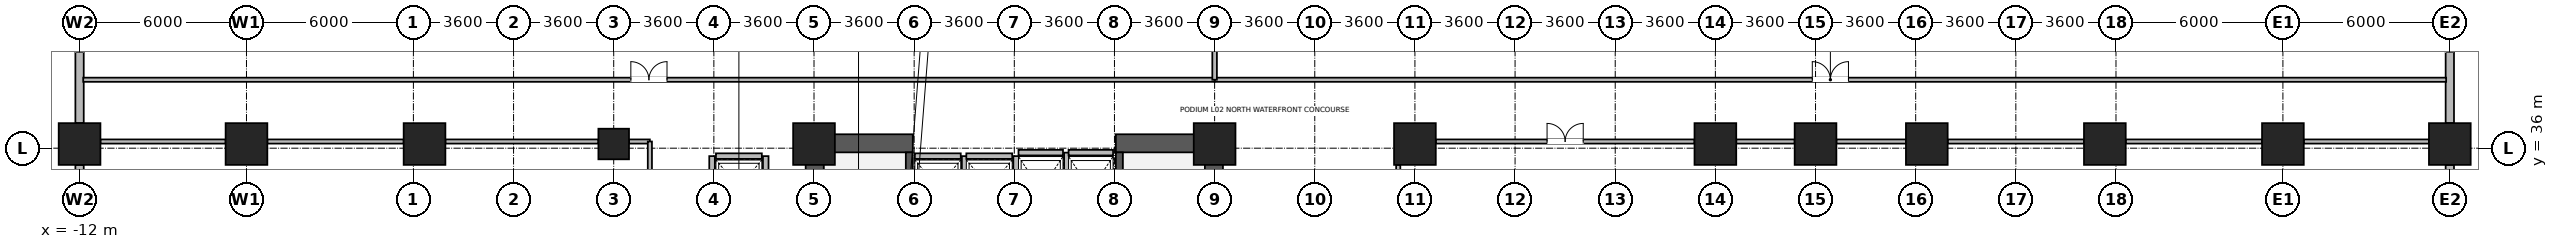
"""IFC4 building model, lengths in metres.
Left out: names, types, materials, properties, quantities, classifications, styles, units other than length and angle.
Written with IfcOpenShell. Run it as: python <this file> out.ifc"""

import sys

from ifc_helpers import new_model, si_unit, direction, frame, frame_2d, origin, origin_2d, place, context, subcontext, project, spatial, rectangle, circle, extrude, source, transform, mapped, element, fill, save


model = new_model("IFC4")
c1 = context("Model", 3, precision=1e-05, world=origin(), true_north=direction((0.0, 1.0)))
c2 = subcontext(c1, "Body", "Model", "MODEL_VIEW")
j1 = project(units=[si_unit("LENGTHUNIT", "METRE"), si_unit("PLANEANGLEUNIT", "RADIAN")], contexts=[c1])
p1 = place(None, origin())
s1 = spatial("IfcSite", under=j1, at=p1, CompositionType="ELEMENT")
p2 = place(p1, origin())
s2 = spatial("IfcBuilding", under=s1, at=p2, CompositionType="ELEMENT")
p3 = place(p2, frame((0.0, 0.0, 10.2)))
s3 = spatial("IfcBuildingStorey", under=s2, at=p3, CompositionType="ELEMENT", Elevation=10.2)
for number, where, z_axis, x_axis in (
    (1, (14.425, 28.2, 0.0), (0.0, 0.0, 1.0), (0.0, 1.0, 0.0)),
    (2, (28.775, 28.2, 0.0), (0.0, 0.0, 1.0), (0.0, 1.0, 0.0)),
):
    element("IfcWall", number, at=place(p3, frame(where, z_axis=z_axis, x_axis=x_axis)), inside=s3, PredefinedType="SHEAR", context=c2, shape_type="SweptSolid", body=[
        extrude(rectangle(XDim=8.3, YDim=0.65, at=frame_2d((4.15, 0.0))), origin(), (0.0, 0.0, 1.0), 4.52),
    ])
for number, where, z_axis, x_axis in (
    (3, (14.75, 36.175, 0.0), (0.0, 0.0, 1.0), (1.0, 0.0, 0.0)),
    (4, (25.25, 36.175, 0.0), (0.0, 0.0, 1.0), (1.0, 0.0, 0.0)),
):
    element("IfcWall", number, at=place(p3, frame(where, z_axis=z_axis, x_axis=x_axis)), inside=s3, PredefinedType="SHEAR", context=c2, shape_type="SweptSolid", body=[
        extrude(rectangle(XDim=3.2, YDim=0.65, at=frame_2d((1.6, 0.0))), origin(), (0.0, 0.0, 1.0), 4.52),
    ])
p4 = place(p3, frame((17.825, 28.85, 0.0), z_axis=(0.0, 0.0, 1.0), x_axis=(0.0, 1.0, 0.0)))
e5 = element("IfcWall", 5, at=p4, inside=s3, PredefinedType="SHEAR", context=c2, shape_type="SweptSolid", body=[
    extrude(rectangle(XDim=7.0, YDim=0.25, at=frame_2d((3.5, 0.0))), origin(), (0.0, 0.0, 1.0), 4.52),
])
p5 = place(p4, frame((0.15, 0.0, 0.0)))
e6 = element("IfcOpeningElement", 6, at=p5, cuts=e5, PredefinedType="OPENING", context=c2, shape_type="SweptSolid", body=[
    extrude(rectangle(XDim=1.1, YDim=2.08, at=frame_2d((0.55, 1.04))), frame((0.0, 0.135, 0.0), z_axis=(0.0, -1.0, 0.0), x_axis=(1.0, 0.0, 0.0)), (0.0, 0.0, 1.0), 0.27),
])
p6 = place(p3, frame((25.375, 28.85, 0.0), z_axis=(0.0, 0.0, 1.0), x_axis=(0.0, 1.0, 0.0)))
e7 = element("IfcWall", 7, at=p6, inside=s3, PredefinedType="SHEAR", context=c2, shape_type="SweptSolid", body=[
    extrude(rectangle(XDim=7.0, YDim=0.25, at=frame_2d((3.5, 0.0))), origin(), (0.0, 0.0, 1.0), 4.52),
])
p7 = place(p6, frame((0.15, 0.0, 0.0)))
e8 = element("IfcOpeningElement", 8, at=p7, cuts=e7, PredefinedType="OPENING", context=c2, shape_type="SweptSolid", body=[
    extrude(rectangle(XDim=1.1, YDim=2.08, at=frame_2d((0.55, 1.04))), frame((0.0, 0.135, 0.0), z_axis=(0.0, -1.0, 0.0), x_axis=(1.0, 0.0, 0.0)), (0.0, 0.0, 1.0), 0.27),
])
m1 = source(origin(), c2, "Body", "SweptSolid", [
    extrude(circle(Radius=0.55, at=origin_2d()), origin(), (0.0, 0.0, 1.0), 4.8),
])
p8 = place(p3, frame((7.2, 36.15, 0.0), z_axis=(0.0, 0.0, 1.0), x_axis=(1.0, 0.0, 0.0)))
e9 = element("IfcColumn", 9, at=p8, inside=s3, PredefinedType="COLUMN", context=c2, shape_type="MappedRepresentation", body=[
    mapped(m1, transform((0.0, 0.0, 0.0), x_axis=(1.0, 0.0, 0.0), y_axis=(0.0, 1.0, 0.0), z_axis=(0.0, 0.0, 1.0), scale=1.0)),
])
m2 = source(origin(), c2, "Body", "SweptSolid", [
    extrude(rectangle(XDim=1.5, YDim=1.5, at=origin_2d()), origin(), (0.0, 0.0, 1.0), 4.8),
])
for number, where, z_axis, x_axis in (
    (10, (14.4, 36.15, 0.0), (0.0, 0.0, 1.0), (1.0, 0.0, 0.0)),
    (11, (28.8, 36.15, 0.0), (0.0, 0.0, 1.0), (1.0, 0.0, 0.0)),
    (12, (36.0, 36.15, 0.0), (0.0, 0.0, 1.0), (1.0, 0.0, 0.0)),
    (13, (46.8, 36.15, 0.0), (0.0, 0.0, 1.0), (1.0, 0.0, 0.0)),
    (14, (50.4, 36.15, 0.0), (0.0, 0.0, 1.0), (1.0, 0.0, 0.0)),
    (15, (54.4, 36.15, 0.0), (0.0, 0.0, 1.0), (1.0, 0.0, 0.0)),
    (16, (0.4, 36.15, 0.0), (0.0, 0.0, 1.0), (1.0, 0.0, 0.0)),
    (17, (60.8, 36.15, 0.0), (0.0, 0.0, 1.0), (1.0, 0.0, 0.0)),
    (18, (-12.0, 36.15, 0.0), (0.0, 0.0, 1.0), (1.0, 0.0, 0.0)),
    (19, (-6.0, 36.15, 0.0), (0.0, 0.0, 1.0), (1.0, 0.0, 0.0)),
    (20, (67.2, 36.15, 0.0), (0.0, 0.0, 1.0), (1.0, 0.0, 0.0)),
    (21, (73.2, 36.15, 0.0), (0.0, 0.0, 1.0), (1.0, 0.0, 0.0)),
):
    element("IfcColumn", number, at=place(p3, frame(where, z_axis=z_axis, x_axis=x_axis)), inside=s3, PredefinedType="COLUMN", context=c2, shape_type="MappedRepresentation", body=[
        mapped(m2, transform((0.0, 0.0, 0.0), x_axis=(1.0, 0.0, 0.0), y_axis=(0.0, 1.0, 0.0), z_axis=(0.0, 0.0, 1.0), scale=1.0)),
    ])
p9 = place(p3, frame((73.2, 35.399, 0.0), z_axis=(0.0, 0.0, 1.0), x_axis=(0.0, -1.0, 0.0)))
e22 = element("IfcWall", 22, at=p9, inside=s3, PredefinedType="STANDARD", context=c2, shape_type="SweptSolid", body=[
    extrude(rectangle(XDim=5.998, YDim=0.3, at=frame_2d((2.999, 0.0))), origin(), (0.0, 0.0, 1.0), 3.9),
])
p10 = place(p9, frame((2.524, 0.0, 0.9)))
e23 = element("IfcOpeningElement", 23, at=p10, cuts=e22, PredefinedType="OPENING", context=c2, shape_type="SweptSolid", body=[
    extrude(rectangle(XDim=0.95, YDim=1.75, at=frame_2d((0.475, 0.875))), frame((0.0, 0.16, 0.0), z_axis=(0.0, -1.0, 0.0), x_axis=(1.0, 0.0, 0.0)), (0.0, 0.0, 1.0), 0.32),
])
p11 = place(p9, frame((1.037, 0.0, 0.9)))
e24 = element("IfcOpeningElement", 24, at=p11, cuts=e22, PredefinedType="OPENING", context=c2, shape_type="SweptSolid", body=[
    extrude(rectangle(XDim=0.95, YDim=1.75, at=frame_2d((0.475, 0.875))), frame((0.0, 0.16, 0.0), z_axis=(0.0, -1.0, 0.0), x_axis=(1.0, 0.0, 0.0)), (0.0, 0.0, 1.0), 0.32),
])
p12 = place(p3, frame((73.2, 44.099, 0.0), z_axis=(0.0, 0.0, 1.0), x_axis=(0.0, -1.0, 0.0)))
e25 = element("IfcWall", 25, at=p12, inside=s3, PredefinedType="STANDARD", context=c2, shape_type="SweptSolid", body=[
    extrude(rectangle(XDim=7.198, YDim=0.3, at=frame_2d((3.599, 0.0))), origin(), (0.0, 0.0, 1.0), 3.9),
])
p13 = place(p12, frame((0.6, 0.0, 0.9)))
e26 = element("IfcOpeningElement", 26, at=p13, cuts=e25, PredefinedType="OPENING", context=c2, shape_type="SweptSolid", body=[
    extrude(rectangle(XDim=2.4, YDim=2.5, at=frame_2d((1.2, 1.25))), frame((0.0, 0.16, 0.0), z_axis=(0.0, -1.0, 0.0), x_axis=(1.0, 0.0, 0.0)), (0.0, 0.0, 1.0), 0.32),
])
p14 = place(p12, frame((3.7, 0.0, 0.9)))
e27 = element("IfcOpeningElement", 27, at=p14, cuts=e25, PredefinedType="OPENING", context=c2, shape_type="SweptSolid", body=[
    extrude(rectangle(XDim=0.95, YDim=1.75, at=frame_2d((0.475, 0.875))), frame((0.0, 0.16, 0.0), z_axis=(0.0, -1.0, 0.0), x_axis=(1.0, 0.0, 0.0)), (0.0, 0.0, 1.0), 0.32),
])
p15 = place(p3, frame((-12.0, 36.901, 0.0), z_axis=(0.0, 0.0, 1.0), x_axis=(0.0, 1.0, 0.0)))
e28 = element("IfcWall", 28, at=p15, inside=s3, PredefinedType="STANDARD", context=c2, shape_type="SweptSolid", body=[
    extrude(rectangle(XDim=7.198, YDim=0.3, at=frame_2d((3.599, 0.0))), origin(), (0.0, 0.0, 1.0), 3.9),
])
p16 = place(p15, frame((4.198, 0.0, 0.9)))
e29 = element("IfcOpeningElement", 29, at=p16, cuts=e28, PredefinedType="OPENING", context=c2, shape_type="SweptSolid", body=[
    extrude(rectangle(XDim=2.4, YDim=2.5, at=frame_2d((1.2, 1.25))), frame((0.0, 0.16, 0.0), z_axis=(0.0, -1.0, 0.0), x_axis=(1.0, 0.0, 0.0)), (0.0, 0.0, 1.0), 0.32),
])
p17 = place(p15, frame((2.548, 0.0, 0.9)))
e30 = element("IfcOpeningElement", 30, at=p17, cuts=e28, PredefinedType="OPENING", context=c2, shape_type="SweptSolid", body=[
    extrude(rectangle(XDim=0.95, YDim=1.75, at=frame_2d((0.475, 0.875))), frame((0.0, 0.16, 0.0), z_axis=(0.0, -1.0, 0.0), x_axis=(1.0, 0.0, 0.0)), (0.0, 0.0, 1.0), 0.32),
])
p18 = place(p3, frame((-12.0, 29.401, 0.0), z_axis=(0.0, 0.0, 1.0), x_axis=(0.0, 1.0, 0.0)))
e31 = element("IfcWall", 31, at=p18, inside=s3, PredefinedType="STANDARD", context=c2, shape_type="SweptSolid", body=[
    extrude(rectangle(XDim=5.998, YDim=0.3, at=frame_2d((2.999, 0.0))), origin(), (0.0, 0.0, 1.0), 3.9),
])
p19 = place(p18, frame((2.524, 0.0, 0.9)))
e32 = element("IfcOpeningElement", 32, at=p19, cuts=e31, PredefinedType="OPENING", context=c2, shape_type="SweptSolid", body=[
    extrude(rectangle(XDim=0.95, YDim=1.75, at=frame_2d((0.475, 0.875))), frame((0.0, 0.16, 0.0), z_axis=(0.0, -1.0, 0.0), x_axis=(1.0, 0.0, 0.0)), (0.0, 0.0, 1.0), 0.32),
])
p20 = place(p18, frame((1.037, 0.0, 0.9)))
e33 = element("IfcOpeningElement", 33, at=p20, cuts=e31, PredefinedType="OPENING", context=c2, shape_type="SweptSolid", body=[
    extrude(rectangle(XDim=0.95, YDim=1.75, at=frame_2d((0.475, 0.875))), frame((0.0, 0.16, 0.0), z_axis=(0.0, -1.0, 0.0), x_axis=(1.0, 0.0, 0.0)), (0.0, 0.0, 1.0), 0.32),
])
p21 = place(p3, frame((18.025, 35.715, 0.0), z_axis=(0.0, 0.0, 1.0), x_axis=(1.0, 0.0, 0.0)))
e34 = element("IfcWall", 34, at=p21, inside=s3, PredefinedType="PARTITIONING", context=c2, shape_type="SweptSolid", body=[
    extrude(rectangle(XDim=1.65, YDim=0.2, at=frame_2d((0.825, 0.0))), origin(), (0.0, 0.0, 1.0), 4.5),
])
p22 = place(p3, frame((19.815, 33.485, 0.0), z_axis=(0.0, 0.0, 1.0), x_axis=(0.0, 1.0, 0.0)))
e35 = element("IfcWall", 35, at=p22, inside=s3, PredefinedType="PARTITIONING", context=c2, shape_type="SweptSolid", body=[
    extrude(rectangle(XDim=2.23, YDim=0.2, at=frame_2d((1.115, 0.0))), origin(), (0.0, 0.0, 1.0), 4.5),
])
p23 = place(p3, frame((19.875, 35.715, 0.0), z_axis=(0.0, 0.0, 1.0), x_axis=(1.0, 0.0, 0.0)))
e36 = element("IfcWall", 36, at=p23, inside=s3, PredefinedType="PARTITIONING", context=c2, shape_type="SweptSolid", body=[
    extrude(rectangle(XDim=1.65, YDim=0.2, at=frame_2d((0.825, 0.0))), origin(), (0.0, 0.0, 1.0), 4.5),
])
p24 = place(p3, frame((21.665, 33.485, 0.0), z_axis=(0.0, 0.0, 1.0), x_axis=(0.0, 1.0, 0.0)))
e37 = element("IfcWall", 37, at=p24, inside=s3, PredefinedType="PARTITIONING", context=c2, shape_type="SweptSolid", body=[
    extrude(rectangle(XDim=2.23, YDim=0.2, at=frame_2d((1.115, 0.0))), origin(), (0.0, 0.0, 1.0), 4.5),
])
p25 = place(p3, frame((10.875, 35.715, 0.0), z_axis=(0.0, 0.0, 1.0), x_axis=(1.0, 0.0, 0.0)))
e38 = element("IfcWall", 38, at=p25, inside=s3, PredefinedType="PARTITIONING", context=c2, shape_type="SweptSolid", body=[
    extrude(rectangle(XDim=1.65, YDim=0.2, at=frame_2d((0.825, 0.0))), origin(), (0.0, 0.0, 1.0), 4.5),
])
for number, where, z_axis, x_axis in (
    (39, (10.735, 33.485, 0.0), (0.0, 0.0, 1.0), (0.0, 1.0, 0.0)),
    (40, (12.665, 33.485, 0.0), (0.0, 0.0, 1.0), (0.0, 1.0, 0.0)),
):
    element("IfcWall", number, at=place(p3, frame(where, z_axis=z_axis, x_axis=x_axis)), inside=s3, PredefinedType="PARTITIONING", context=c2, shape_type="SweptSolid", body=[
        extrude(rectangle(XDim=2.23, YDim=0.2, at=frame_2d((1.115, 0.0))), origin(), (0.0, 0.0, 1.0), 4.5),
    ])
p26 = place(p3, frame((21.75, 35.84, 0.0), z_axis=(0.0, 0.0, 1.0), x_axis=(1.0, 0.0, 0.0)))
e41 = element("IfcWall", 41, at=p26, inside=s3, PredefinedType="PARTITIONING", context=c2, shape_type="SweptSolid", body=[
    extrude(rectangle(XDim=1.6, YDim=0.2, at=frame_2d((0.8, 0.0))), origin(), (0.0, 0.0, 1.0), 3.3),
])
p27 = place(p3, frame((23.49, 33.16, 0.0), z_axis=(0.0, 0.0, 1.0), x_axis=(0.0, 1.0, 0.0)))
e42 = element("IfcWall", 42, at=p27, inside=s3, PredefinedType="PARTITIONING", context=c2, shape_type="SweptSolid", body=[
    extrude(rectangle(XDim=2.68, YDim=0.2, at=frame_2d((1.34, 0.0))), origin(), (0.0, 0.0, 1.0), 4.5),
])
p28 = place(p3, frame((23.55, 35.84, 0.0), z_axis=(0.0, 0.0, 1.0), x_axis=(1.0, 0.0, 0.0)))
e43 = element("IfcWall", 43, at=p28, inside=s3, PredefinedType="PARTITIONING", context=c2, shape_type="SweptSolid", body=[
    extrude(rectangle(XDim=1.6, YDim=0.2, at=frame_2d((0.8, 0.0))), origin(), (0.0, 0.0, 1.0), 3.3),
])
p29 = place(p3, frame((28.8, 38.46, 0.0), z_axis=(0.0, 0.0, 1.0), x_axis=(1.0, 0.0, 0.0)))
e44 = element("IfcWall", 44, at=p29, inside=s3, PredefinedType="PARTITIONING", context=c2, shape_type="SweptSolid", body=[
    extrude(rectangle(XDim=44.268, YDim=0.15, at=frame_2d((22.134, 0.0))), origin(), (0.0, 0.0, 1.0), 4.5),
])
p30 = place(p29, frame((21.484, 0.0, 0.0)))
e45 = element("IfcOpeningElement", 45, at=p30, cuts=e44, PredefinedType="OPENING", context=c2, shape_type="SweptSolid", body=[
    extrude(rectangle(XDim=1.3, YDim=2.12, at=frame_2d((0.65, 1.06))), frame((0.0, 0.085, 0.0), z_axis=(0.0, -1.0, 0.0), x_axis=(1.0, 0.0, 0.0)), (0.0, 0.0, 1.0), 0.17),
])
p31 = place(p3, frame((-11.868, 38.46, 0.0), z_axis=(0.0, 0.0, 1.0), x_axis=(1.0, 0.0, 0.0)))
e46 = element("IfcWall", 46, at=p31, inside=s3, PredefinedType="PARTITIONING", context=c2, shape_type="SweptSolid", body=[
    extrude(rectangle(XDim=40.668, YDim=0.15, at=frame_2d((20.334, 0.0))), origin(), (0.0, 0.0, 1.0), 4.5),
])
p32 = place(p31, frame((19.684, 0.0, 0.0)))
e47 = element("IfcOpeningElement", 47, at=p32, cuts=e46, PredefinedType="OPENING", context=c2, shape_type="SweptSolid", body=[
    extrude(rectangle(XDim=1.3, YDim=2.12, at=frame_2d((0.65, 1.06))), frame((0.0, 0.085, 0.0), z_axis=(0.0, -1.0, 0.0), x_axis=(1.0, 0.0, 0.0)), (0.0, 0.0, 1.0), 0.17),
])
p33 = place(p3, frame((36.75, 36.24, 0.0), z_axis=(0.0, 0.0, 1.0), x_axis=(1.0, 0.0, 0.0)))
e48 = element("IfcWall", 48, at=p33, inside=s3, PredefinedType="PARTITIONING", context=c2, shape_type="SweptSolid", body=[
    extrude(rectangle(XDim=9.3, YDim=0.15, at=frame_2d((4.65, 0.0))), origin(), (0.0, 0.0, 1.0), 3.8),
])
p34 = place(p33, frame((4.0, 0.0, 0.0)))
e49 = element("IfcOpeningElement", 49, at=p34, cuts=e48, PredefinedType="OPENING", context=c2, shape_type="SweptSolid", body=[
    extrude(rectangle(XDim=1.3, YDim=2.12, at=frame_2d((0.65, 1.06))), frame((0.0, 0.085, 0.0), z_axis=(0.0, -1.0, 0.0), x_axis=(1.0, 0.0, 0.0)), (0.0, 0.0, 1.0), 0.17),
])
p35 = place(p3, frame((47.55, 36.24, 0.0), z_axis=(0.0, 0.0, 1.0), x_axis=(1.0, 0.0, 0.0)))
e50 = element("IfcWall", 50, at=p35, inside=s3, PredefinedType="PARTITIONING", context=c2, shape_type="SweptSolid", body=[
    extrude(rectangle(XDim=2.1, YDim=0.15, at=frame_2d((1.05, 0.0))), origin(), (0.0, 0.0, 1.0), 3.8),
])
p36 = place(p3, frame((51.15, 36.24, 0.0), z_axis=(0.0, 0.0, 1.0), x_axis=(1.0, 0.0, 0.0)))
e51 = element("IfcWall", 51, at=p36, inside=s3, PredefinedType="PARTITIONING", context=c2, shape_type="SweptSolid", body=[
    extrude(rectangle(XDim=2.5, YDim=0.15, at=frame_2d((1.25, 0.0))), origin(), (0.0, 0.0, 1.0), 3.8),
])
p37 = place(p3, frame((55.15, 36.24, 0.0), z_axis=(0.0, 0.0, 1.0), x_axis=(1.0, 0.0, 0.0)))
e52 = element("IfcWall", 52, at=p37, inside=s3, PredefinedType="PARTITIONING", context=c2, shape_type="SweptSolid", body=[
    extrude(rectangle(XDim=4.9, YDim=0.15, at=frame_2d((2.45, 0.0))), origin(), (0.0, 0.0, 1.0), 3.8),
])
p38 = place(p3, frame((61.55, 36.24, 0.0), z_axis=(0.0, 0.0, 1.0), x_axis=(1.0, 0.0, 0.0)))
e53 = element("IfcWall", 53, at=p38, inside=s3, PredefinedType="PARTITIONING", context=c2, shape_type="SweptSolid", body=[
    extrude(rectangle(XDim=4.9, YDim=0.15, at=frame_2d((2.45, 0.0))), origin(), (0.0, 0.0, 1.0), 3.8),
])
p39 = place(p3, frame((67.95, 36.24, 0.0), z_axis=(0.0, 0.0, 1.0), x_axis=(1.0, 0.0, 0.0)))
e54 = element("IfcWall", 54, at=p39, inside=s3, PredefinedType="PARTITIONING", context=c2, shape_type="SweptSolid", body=[
    extrude(rectangle(XDim=4.5, YDim=0.15, at=frame_2d((2.25, 0.0))), origin(), (0.0, 0.0, 1.0), 3.8),
])
p40 = place(p3, frame((35.4, 29.4, 0.0), z_axis=(0.0, 0.0, 1.0), x_axis=(0.0, 1.0, 0.0)))
e55 = element("IfcWall", 55, at=p40, inside=s3, PredefinedType="PARTITIONING", context=c2, shape_type="SweptSolid", body=[
    extrude(rectangle(XDim=6.0, YDim=0.15, at=frame_2d((3.0, 0.0))), origin(), (0.0, 0.0, 1.0), 4.5),
])
p41 = place(p3, frame((-11.25, 36.24, 0.0), z_axis=(0.0, 0.0, 1.0), x_axis=(1.0, 0.0, 0.0)))
e56 = element("IfcWall", 56, at=p41, inside=s3, PredefinedType="PARTITIONING", context=c2, shape_type="SweptSolid", body=[
    extrude(rectangle(XDim=4.5, YDim=0.15, at=frame_2d((2.25, 0.0))), origin(), (0.0, 0.0, 1.0), 3.8),
])
p42 = place(p3, frame((-5.25, 36.24, 0.0), z_axis=(0.0, 0.0, 1.0), x_axis=(1.0, 0.0, 0.0)))
e57 = element("IfcWall", 57, at=p42, inside=s3, PredefinedType="PARTITIONING", context=c2, shape_type="SweptSolid", body=[
    extrude(rectangle(XDim=4.9, YDim=0.15, at=frame_2d((2.45, 0.0))), origin(), (0.0, 0.0, 1.0), 3.8),
])
p43 = place(p3, frame((1.15, 36.24, 0.0), z_axis=(0.0, 0.0, 1.0), x_axis=(1.0, 0.0, 0.0)))
e58 = element("IfcWall", 58, at=p43, inside=s3, PredefinedType="PARTITIONING", context=c2, shape_type="SweptSolid", body=[
    extrude(rectangle(XDim=5.5, YDim=0.15, at=frame_2d((2.75, 0.0))), origin(), (0.0, 0.0, 1.0), 3.8),
])
p44 = place(p3, frame((7.75, 36.24, 0.0), z_axis=(0.0, 0.0, 1.0), x_axis=(1.0, 0.0, 0.0)))
e59 = element("IfcWall", 59, at=p44, inside=s3, PredefinedType="PARTITIONING", context=c2, shape_type="SweptSolid", body=[
    extrude(rectangle(XDim=0.75, YDim=0.15, at=frame_2d((0.375, 0.0))), origin(), (0.0, 0.0, 1.0), 3.8),
])
p45 = place(p3, frame((8.5, 28.56, 0.0), z_axis=(0.0, 0.0, 1.0), x_axis=(0.0, 1.0, 0.0)))
e60 = element("IfcWall", 60, at=p45, inside=s3, PredefinedType="PARTITIONING", context=c2, shape_type="SweptSolid", body=[
    extrude(rectangle(XDim=7.68, YDim=0.15, at=frame_2d((3.84, 0.0))), origin(), (0.0, 0.0, 1.0), 4.5),
])
p46 = place(p3, frame((28.8, 38.46, 0.0), z_axis=(0.0, 0.0, 1.0), x_axis=(0.0, 1.0, 0.0)))
e61 = element("IfcWall", 61, at=p46, inside=s3, PredefinedType="PARTITIONING", context=c2, shape_type="SweptSolid", body=[
    extrude(rectangle(XDim=6.408, YDim=0.165, at=frame_2d((3.204, 0.0))), origin(), (0.0, 0.0, 1.0), 3.9),
])
p47 = place(p14, origin())
e62 = element("IfcWindow", 62, at=p47, inside=s3, PartitioningType="SINGLE_PANEL", PredefinedType="WINDOW", context=c2, shape_type="SweptSolid", body=[
    extrude(rectangle(XDim=0.95, YDim=1.75, at=frame_2d((0.475, 0.875))), frame((0.0, 0.03, 0.0), z_axis=(0.0, -1.0, 0.0), x_axis=(1.0, 0.0, 0.0)), (0.0, 0.0, 1.0), 0.06),
])
fill(e27, e62)
p48 = place(p17, origin())
e63 = element("IfcWindow", 63, at=p48, inside=s3, PartitioningType="SINGLE_PANEL", PredefinedType="WINDOW", context=c2, shape_type="SweptSolid", body=[
    extrude(rectangle(XDim=0.95, YDim=1.75, at=frame_2d((0.475, 0.875))), frame((0.0, 0.03, 0.0), z_axis=(0.0, -1.0, 0.0), x_axis=(1.0, 0.0, 0.0)), (0.0, 0.0, 1.0), 0.06),
])
fill(e30, e63)
p49 = place(p30, origin())
e64 = element("IfcDoor", 64, at=p49, inside=s3, OperationType="DOUBLE_DOOR_SINGLE_SWING", PredefinedType="DOOR", context=c2, shape_type="SweptSolid", body=[
    extrude(rectangle(XDim=1.3, YDim=2.12, at=frame_2d((0.65, 1.06))), frame((0.0, 0.025, 0.0), z_axis=(0.0, -1.0, 0.0), x_axis=(1.0, 0.0, 0.0)), (0.0, 0.0, 1.0), 0.05),
])
fill(e45, e64)
p50 = place(p32, origin())
e65 = element("IfcDoor", 65, at=p50, inside=s3, OperationType="DOUBLE_DOOR_SINGLE_SWING", PredefinedType="DOOR", context=c2, shape_type="SweptSolid", body=[
    extrude(rectangle(XDim=1.3, YDim=2.12, at=frame_2d((0.65, 1.06))), frame((0.0, 0.025, 0.0), z_axis=(0.0, -1.0, 0.0), x_axis=(1.0, 0.0, 0.0)), (0.0, 0.0, 1.0), 0.05),
])
fill(e47, e65)
p51 = place(p34, origin())
e66 = element("IfcDoor", 66, at=p51, inside=s3, OperationType="DOUBLE_DOOR_SINGLE_SWING", PredefinedType="DOOR", context=c2, shape_type="SweptSolid", body=[
    extrude(rectangle(XDim=1.3, YDim=2.12, at=frame_2d((0.65, 1.06))), frame((0.0, 0.025, 0.0), z_axis=(0.0, -1.0, 0.0), x_axis=(1.0, 0.0, 0.0)), (0.0, 0.0, 1.0), 0.05),
])
fill(e49, e66)
save(model, sys.argv[1])
